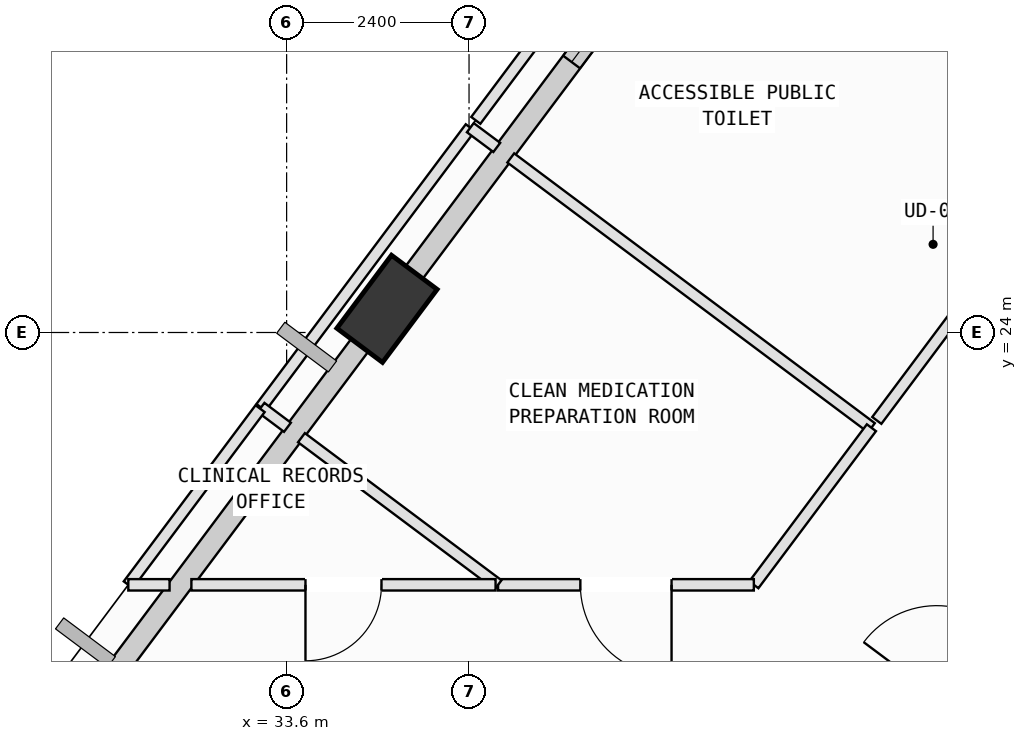
"""IFC4 building model, lengths in metres.
Left out: names, types, materials, properties, quantities, classifications, styles, units other than length and angle.
Written with IfcOpenShell. Run it as: python <this file> out.ifc"""

import sys

from ifc_helpers import new_model, si_unit, direction, frame, frame_2d, origin, origin_2d, place, context, subcontext, project, spatial, rectangle, extrude, element, fill, save


model = new_model("IFC4")
c1 = context("Model", 3, precision=1e-05, world=origin(), true_north=direction((0.0, 1.0)))
c2 = subcontext(c1, "Body", "Model", "MODEL_VIEW")
j1 = project(units=[si_unit("LENGTHUNIT", "METRE"), si_unit("PLANEANGLEUNIT", "RADIAN")], contexts=[c1])
p1 = place(None, origin())
s1 = spatial("IfcSite", under=j1, at=p1, CompositionType="ELEMENT")
p2 = place(p1, origin())
s2 = spatial("IfcBuilding", under=s1, at=p2, CompositionType="ELEMENT")
p3 = place(p2, frame((0.0, 0.0, 251.2)))
s3 = spatial("IfcBuildingStorey", under=s2, at=p3, CompositionType="ELEMENT", Elevation=251.2)
p4 = place(p3, frame((34.921, 24.312, 0.002), z_axis=(0.001954881495, 0.005498104203, 0.999982974499), x_axis=(-0.83265701767, -0.553769318945, 0.004672506767)))
e1 = element("IfcColumn", 1, at=p4, inside=s3, PredefinedType="COLUMN", context=c2, shape_type="SweptSolid", body=[
    extrude(rectangle(XDim=1.2, YDim=0.75, at=origin_2d()), origin(), (0.0, 0.0, 1.0), 3.996),
])
p5 = place(p3, frame((35.165, 24.639, 0.0), z_axis=(0.0, 0.0, 1.0), x_axis=(0.599054928416, 0.800707932233, 0.0)))
e2 = element("IfcWall", 2, at=p5, inside=s3, PredefinedType="SOLIDWALL", context=c2, shape_type="SweptSolid", body=[
    extrude(rectangle(XDim=6.409, YDim=0.28, at=frame_2d((3.205, 0.0))), origin(), (0.0, 0.0, 1.0), 3.265),
])
p6 = place(p5, frame((3.646, 0.0, 0.75)))
e3 = element("IfcOpeningElement", 3, at=p6, cuts=e2, PredefinedType="OPENING", context=c2, shape_type="SweptSolid", body=[
    extrude(rectangle(XDim=1.6, YDim=1.95, at=frame_2d((0.8, 0.975))), frame((0.0, 0.15, 0.0), z_axis=(0.0, -1.0, 0.0), x_axis=(1.0, 0.0, 0.0)), (0.0, 0.0, 1.0), 0.3),
])
p7 = place(p3, frame((31.0, 19.071, 0.0), z_axis=(0.0, 0.0, 1.0), x_axis=(0.599041737495, 0.800717800938, 0.0)))
e4 = element("IfcWall", 4, at=p7, inside=s3, PredefinedType="SOLIDWALL", context=c2, shape_type="SweptSolid", body=[
    extrude(rectangle(XDim=6.158, YDim=0.28, at=frame_2d((3.079, 0.0))), origin(), (0.0, 0.0, 1.0), 3.265),
])
p8 = place(p3, frame((24.911, 23.12, 0.0), z_axis=(0.0, 0.0, 1.0), x_axis=(0.800736238288, -0.599017092154, 0.0)))
e5 = element("IfcWall", 5, at=p8, inside=s3, PredefinedType="SOLIDWALL", context=c2, shape_type="SweptSolid", body=[
    extrude(rectangle(XDim=6.958, YDim=0.28, at=frame_2d((3.479, 0.0))), origin(), (0.0, 0.0, 1.0), 3.165),
])
p9 = place(p3, frame((41.213, 17.949, 0.0), z_axis=(0.0, 0.0, 1.0), x_axis=(0.599081575716, 0.800687995187, 0.0)))
e6 = element("IfcWall", 6, at=p9, inside=s3, PredefinedType="PARTITIONING", context=c2, shape_type="SweptSolid", body=[
    extrude(rectangle(XDim=4.34, YDim=0.15, at=frame_2d((2.17, 0.0))), origin(), (0.0, 0.0, 1.0), 3.78),
])
p10 = place(p9, frame((1.57, 0.0, 0.0)))
e7 = element("IfcOpeningElement", 7, at=p10, cuts=e6, PredefinedType="OPENING", context=c2, shape_type="SweptSolid", body=[
    extrude(rectangle(XDim=1.2, YDim=2.15, at=frame_2d((0.6, 1.075))), frame((0.0, 0.085, 0.0), z_axis=(0.0, -1.0, 0.0), x_axis=(1.0, 0.0, 0.0)), (0.0, 0.0, 1.0), 0.17),
])
p11 = place(p3, frame((33.263, 23.014, 0.0), z_axis=(0.0, 0.0, 1.0), x_axis=(0.599064962101, 0.800700425367, 0.0)))
e8 = element("IfcWall", 8, at=p11, inside=s3, PredefinedType="PARTITIONING", context=c2, shape_type="SweptSolid", body=[
    extrude(rectangle(XDim=4.597, YDim=0.15, at=frame_2d((2.299, 0.0))), origin(), (0.0, 0.0, 1.0), 3.78),
])
p12 = place(p3, frame((36.017, 26.695, 0.0), z_axis=(0.0, 0.0, 1.0), x_axis=(0.80101066545, -0.598650076284, 0.0)))
e9 = element("IfcWall", 9, at=p12, inside=s3, PredefinedType="PARTITIONING", context=c2, shape_type="SweptSolid", body=[
    extrude(rectangle(XDim=0.434, YDim=0.15, at=frame_2d((0.217, 0.0))), origin(), (0.0, 0.0, 1.0), 3.78),
])
p13 = place(p3, frame((36.549, 26.297, 0.0), z_axis=(0.0, 0.0, 1.0), x_axis=(0.800696541922, -0.599070152616, 0.0)))
e10 = element("IfcWall", 10, at=p13, inside=s3, PredefinedType="PARTITIONING", context=c2, shape_type="SweptSolid", body=[
    extrude(rectangle(XDim=5.926, YDim=0.15, at=frame_2d((2.963, 0.0))), origin(), (0.0, 0.0, 1.0), 3.78),
])
p14 = place(p3, frame((41.294, 22.747, 0.0), z_axis=(0.0, 0.0, 1.0), x_axis=(-0.599137256843, -0.800646331074, 0.0)))
e11 = element("IfcWall", 11, at=p14, inside=s3, PredefinedType="PARTITIONING", context=c2, shape_type="SweptSolid", body=[
    extrude(rectangle(XDim=2.582, YDim=0.15, at=frame_2d((1.291, 0.0))), origin(), (0.0, 0.0, 1.0), 3.78),
])
p15 = place(p3, frame((39.747, 20.68, 0.0), z_axis=(0.0, 0.0, 1.0), x_axis=(-1.0, 0.0, 0.0)))
e12 = element("IfcWall", 12, at=p15, inside=s3, PredefinedType="PARTITIONING", context=c2, shape_type="SweptSolid", body=[
    extrude(rectangle(XDim=3.365, YDim=0.15, at=frame_2d((1.683, 0.0))), origin(), (0.0, 0.0, 1.0), 3.415),
])
p16 = place(p15, frame((1.083, 0.0, 0.0)))
e13 = element("IfcOpeningElement", 13, at=p16, cuts=e12, PredefinedType="OPENING", context=c2, shape_type="SweptSolid", body=[
    extrude(rectangle(XDim=1.2, YDim=2.15, at=frame_2d((0.6, 1.075))), frame((0.0, 0.085, 0.0), z_axis=(0.0, -1.0, 0.0), x_axis=(1.0, 0.0, 0.0)), (0.0, 0.0, 1.0), 0.17),
])
p17 = place(p3, frame((36.382, 20.68, 0.0), z_axis=(0.0, 0.0, 1.0), x_axis=(-0.800643257671, 0.599141363908, 0.0)))
e14 = element("IfcWall", 14, at=p17, inside=s3, PredefinedType="PARTITIONING", context=c2, shape_type="SweptSolid", body=[
    extrude(rectangle(XDim=3.231, YDim=0.15, at=frame_2d((1.616, 0.0))), origin(), (0.0, 0.0, 1.0), 3.78),
])
p18 = place(p3, frame((33.611, 22.753, 0.0), z_axis=(0.0, 0.0, 1.0), x_axis=(-0.800134644868, 0.599820431531, 0.0)))
e15 = element("IfcWall", 15, at=p18, inside=s3, PredefinedType="PARTITIONING", context=c2, shape_type="SweptSolid", body=[
    extrude(rectangle(XDim=0.435, YDim=0.15, at=frame_2d((0.218, 0.0))), origin(), (0.0, 0.0, 1.0), 3.78),
])
p19 = place(p3, frame((44.119, 26.525, 0.0), z_axis=(0.0, 0.0, 1.0), x_axis=(-0.598954503675, -0.800783055844, 0.0)))
e16 = element("IfcWall", 16, at=p19, inside=s3, PredefinedType="PARTITIONING", context=c2, shape_type="SweptSolid", body=[
    extrude(rectangle(XDim=4.598, YDim=0.15, at=frame_2d((2.299, 0.0))), origin(), (0.0, 0.0, 1.0), 3.78),
])
p20 = place(p19, frame((1.839, 0.0, 0.0)))
e17 = element("IfcOpeningElement", 17, at=p20, cuts=e16, PredefinedType="OPENING", context=c2, shape_type="SweptSolid", body=[
    extrude(rectangle(XDim=0.92, YDim=2.1, at=frame_2d((0.46, 1.05))), frame((0.0, 0.085, 0.0), z_axis=(0.0, -1.0, 0.0), x_axis=(1.0, 0.0, 0.0)), (0.0, 0.0, 1.0), 0.17),
])
p21 = place(p3, frame((36.089, 26.791, 0.0), z_axis=(0.0, 0.0, 1.0), x_axis=(0.599056387828, 0.800706840362, 0.0)))
e18 = element("IfcWall", 18, at=p21, inside=s3, PredefinedType="PARTITIONING", context=c2, shape_type="SweptSolid", body=[
    extrude(rectangle(XDim=4.597, YDim=0.15, at=frame_2d((2.299, 0.0))), origin(), (0.0, 0.0, 1.0), 3.265),
])
p22 = place(p3, frame((38.843, 30.472, 0.0), z_axis=(0.0, 0.0, 1.0), x_axis=(0.800719737782, -0.599039148576, 0.0)))
e19 = element("IfcWall", 19, at=p22, inside=s3, PredefinedType="PARTITIONING", context=c2, shape_type="SweptSolid", body=[
    extrude(rectangle(XDim=6.589, YDim=0.15, at=frame_2d((3.294, 0.0))), origin(), (0.0, 0.0, 1.0), 3.78),
])
p23 = place(p3, frame((31.517, 20.68, 0.0), z_axis=(0.0, 0.0, 1.0), x_axis=(0.598960463684, 0.800778597955, 0.0)))
e20 = element("IfcWall", 20, at=p23, inside=s3, PredefinedType="PARTITIONING", context=c2, shape_type="SweptSolid", body=[
    extrude(rectangle(XDim=2.895, YDim=0.15, at=frame_2d((1.447, 0.0))), origin(), (0.0, 0.0, 1.0), 3.78),
])
p24 = place(p3, frame((36.349, 20.68, 0.0), z_axis=(0.0, 0.0, 1.0), x_axis=(-1.0, 0.0, 0.0)))
e21 = element("IfcWall", 21, at=p24, inside=s3, PredefinedType="PARTITIONING", context=c2, shape_type="SweptSolid", body=[
    extrude(rectangle(XDim=4.002, YDim=0.15, at=frame_2d((2.001, 0.0))), origin(), (0.0, 0.0, 1.0), 3.415),
])
p25 = place(p24, frame((1.501, 0.0, 0.0)))
e22 = element("IfcOpeningElement", 22, at=p25, cuts=e21, PredefinedType="OPENING", context=c2, shape_type="SweptSolid", body=[
    extrude(rectangle(XDim=1.0, YDim=2.12, at=frame_2d((0.5, 1.06))), frame((0.0, 0.085, 0.0), z_axis=(0.0, -1.0, 0.0), x_axis=(1.0, 0.0, 0.0)), (0.0, 0.0, 1.0), 0.17),
])
p26 = place(p3, frame((32.06, 20.68, 0.0), z_axis=(0.0, 0.0, 1.0), x_axis=(-1.0, 0.0, 0.0)))
e23 = element("IfcWall", 23, at=p26, inside=s3, PredefinedType="PARTITIONING", context=c2, shape_type="SweptSolid", body=[
    extrude(rectangle(XDim=0.543, YDim=0.15, at=frame_2d((0.271, 0.0))), origin(), (0.0, 0.0, 1.0), 3.78),
])
p27 = place(p6, origin())
e24 = element("IfcWindow", 24, at=p27, inside=s3, PartitioningType="SINGLE_PANEL", PredefinedType="WINDOW", context=c2, shape_type="SweptSolid", body=[
    extrude(rectangle(XDim=1.6, YDim=1.95, at=frame_2d((0.8, 0.975))), frame((0.0, 0.03, 0.0), z_axis=(0.0, -1.0, 0.0), x_axis=(1.0, 0.0, 0.0)), (0.0, 0.0, 1.0), 0.06),
])
fill(e3, e24)
p28 = place(p10, origin())
e25 = element("IfcDoor", 25, at=p28, inside=s3, OperationType="SINGLE_SWING_LEFT", PredefinedType="DOOR", context=c2, shape_type="SweptSolid", body=[
    extrude(rectangle(XDim=1.2, YDim=2.15, at=frame_2d((0.6, 1.075))), frame((0.0, 0.025, 0.0), z_axis=(0.0, -1.0, 0.0), x_axis=(1.0, 0.0, 0.0)), (0.0, 0.0, 1.0), 0.05),
])
fill(e7, e25)
p29 = place(p16, origin())
e26 = element("IfcDoor", 26, at=p29, inside=s3, OperationType="SINGLE_SWING_LEFT", PredefinedType="DOOR", context=c2, shape_type="SweptSolid", body=[
    extrude(rectangle(XDim=1.2, YDim=2.15, at=frame_2d((0.6, 1.075))), frame((0.0, 0.025, 0.0), z_axis=(0.0, -1.0, 0.0), x_axis=(1.0, 0.0, 0.0)), (0.0, 0.0, 1.0), 0.05),
])
fill(e13, e26)
p30 = place(p25, origin())
e27 = element("IfcDoor", 27, at=p30, inside=s3, OperationType="SINGLE_SWING_RIGHT", PredefinedType="DOOR", context=c2, shape_type="SweptSolid", body=[
    extrude(rectangle(XDim=1.0, YDim=2.12, at=frame_2d((0.5, 1.06))), frame((0.0, 0.025, 0.0), z_axis=(0.0, -1.0, 0.0), x_axis=(1.0, 0.0, 0.0)), (0.0, 0.0, 1.0), 0.05),
])
fill(e22, e27)
save(model, sys.argv[1])
